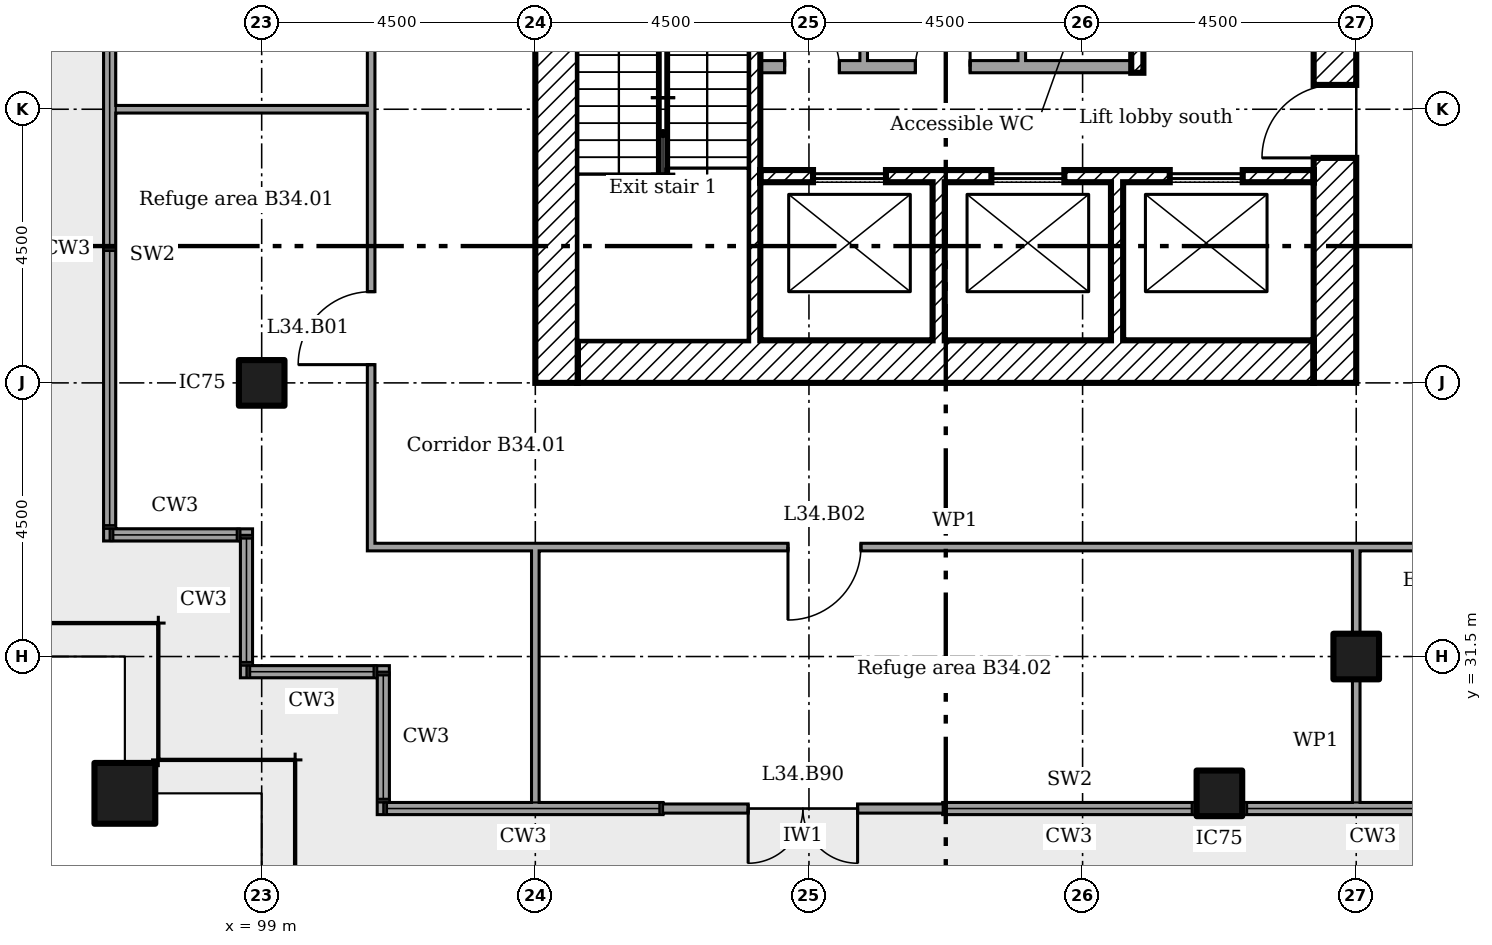
"""IFC4 building model, lengths in metres.
Left out: names, types, materials, properties, quantities, classifications, styles, units other than length and angle.
Written with IfcOpenShell. Run it as: python <this file> out.ifc"""

import sys

from ifc_helpers import new_model, si_unit, direction, frame, frame_2d, origin, origin_2d, place, context, subcontext, project, spatial, rectangle, extrude, element, fill, save


model = new_model("IFC4")
c1 = context("Model", 3, precision=1e-05, world=origin(), true_north=direction((0.0, 1.0)))
c2 = subcontext(c1, "Body", "Model", "MODEL_VIEW")
j1 = project(units=[si_unit("LENGTHUNIT", "METRE"), si_unit("PLANEANGLEUNIT", "RADIAN")], contexts=[c1])
p1 = place(None, origin())
s1 = spatial("IfcSite", under=j1, at=p1, CompositionType="ELEMENT")
p2 = place(p1, origin())
s2 = spatial("IfcBuilding", under=s1, at=p2, CompositionType="ELEMENT")
p3 = place(p2, frame((0.0, 0.0, 138.8)))
s3 = spatial("IfcBuildingStorey", under=s2, at=p3, CompositionType="ELEMENT", Elevation=138.8)
p4 = place(p3, frame((96.75, 29.25, 0.0)))
e1 = element("IfcColumn", 1, at=p4, inside=s3, PredefinedType="COLUMN", context=c2, shape_type="SweptSolid", body=[
    extrude(rectangle(XDim=1.0, YDim=1.0, at=origin_2d()), origin(), (0.0, 0.0, 1.0), 5.0),
])
for number, where in (
    (2, (99.0, 36.0, 0.0)),
    (3, (114.75, 29.25, 0.0)),
    (4, (117.0, 31.5, 0.0)),
):
    element("IfcColumn", number, at=place(p3, frame(where)), inside=s3, PredefinedType="COLUMN", context=c2, shape_type="SweptSolid", body=[
        extrude(rectangle(XDim=0.75, YDim=0.75, at=origin_2d()), origin(), (0.0, 0.0, 1.0), 5.0),
    ])
p5 = place(p3, frame((96.5, 42.8, 0.0), z_axis=(0.0, 0.0, 1.0), x_axis=(0.0, -1.0, 0.0)))
e5 = element("IfcWall", 5, at=p5, inside=s3, PredefinedType="ELEMENTEDWALL", context=c2, shape_type="SweptSolid", body=[
    extrude(rectangle(XDim=9.4, YDim=0.2, at=frame_2d((4.7, 0.0))), origin(), (0.0, 0.0, 1.0), 1.8),
])
p6 = place(p3, frame((96.6, 33.5, 0.0)))
e6 = element("IfcWall", 6, at=p6, inside=s3, PredefinedType="ELEMENTEDWALL", context=c2, shape_type="SweptSolid", body=[
    extrude(rectangle(XDim=2.25, YDim=0.2, at=frame_2d((1.125, 0.0))), origin(), (0.0, 0.0, 1.0), 1.8),
])
p7 = place(p3, frame((98.75, 33.4, 0.0), z_axis=(0.0, 0.0, 1.0), x_axis=(0.0, -1.0, 0.0)))
e7 = element("IfcWall", 7, at=p7, inside=s3, PredefinedType="ELEMENTEDWALL", context=c2, shape_type="SweptSolid", body=[
    extrude(rectangle(XDim=2.25, YDim=0.2, at=frame_2d((1.125, 0.0))), origin(), (0.0, 0.0, 1.0), 1.8),
])
p8 = place(p3, frame((98.85, 31.25, 0.0)))
e8 = element("IfcWall", 8, at=p8, inside=s3, PredefinedType="ELEMENTEDWALL", context=c2, shape_type="SweptSolid", body=[
    extrude(rectangle(XDim=2.25, YDim=0.2, at=frame_2d((1.125, 0.0))), origin(), (0.0, 0.0, 1.0), 1.8),
])
p9 = place(p3, frame((101.0, 31.15, 0.0), z_axis=(0.0, 0.0, 1.0), x_axis=(0.0, -1.0, 0.0)))
e9 = element("IfcWall", 9, at=p9, inside=s3, PredefinedType="ELEMENTEDWALL", context=c2, shape_type="SweptSolid", body=[
    extrude(rectangle(XDim=2.25, YDim=0.2, at=frame_2d((1.125, 0.0))), origin(), (0.0, 0.0, 1.0), 1.8),
])
p10 = place(p3, frame((101.1, 29.0, 0.0)))
e10 = element("IfcWall", 10, at=p10, inside=s3, PredefinedType="ELEMENTEDWALL", context=c2, shape_type="SweptSolid", body=[
    extrude(rectangle(XDim=4.5, YDim=0.2, at=frame_2d((2.25, 0.0))), origin(), (0.0, 0.0, 1.0), 1.8),
])
p11 = place(p3, frame((110.2, 29.0, 0.0)))
e11 = element("IfcWall", 11, at=p11, inside=s3, PredefinedType="ELEMENTEDWALL", context=c2, shape_type="SweptSolid", body=[
    extrude(rectangle(XDim=4.175, YDim=0.2, at=frame_2d((2.087, 0.0))), origin(), (0.0, 0.0, 1.0), 1.8),
])
p12 = place(p3, frame((115.125, 29.0, 0.0)))
e12 = element("IfcWall", 12, at=p12, inside=s3, PredefinedType="ELEMENTEDWALL", context=c2, shape_type="SweptSolid", body=[
    extrude(rectangle(XDim=4.475, YDim=0.2, at=frame_2d((2.238, 0.0))), origin(), (0.0, 0.0, 1.0), 1.8),
])
p13 = place(p3, frame((105.6, 29.0, 0.0)))
e13 = element("IfcWall", 13, at=p13, inside=s3, PredefinedType="SOLIDWALL", context=c2, shape_type="SweptSolid", body=[
    extrude(rectangle(XDim=4.6, YDim=0.15, at=frame_2d((2.3, 0.0))), origin(), (0.0, 0.0, 1.0), 4.85),
])
p14 = place(p13, frame((1.4, 0.0, 0.0)))
e14 = element("IfcOpeningElement", 14, at=p14, cuts=e13, PredefinedType="OPENING", context=c2, shape_type="SweptSolid", body=[
    extrude(rectangle(XDim=1.8, YDim=2.4, at=frame_2d((0.9, 1.2))), frame((0.0, 0.085, 0.0), z_axis=(0.0, -1.0, 0.0), x_axis=(1.0, 0.0, 0.0)), (0.0, 0.0, 1.0), 0.17),
])
p15 = place(p3, frame((116.65, 36.0, 0.0), z_axis=(0.0, 0.0, 1.0), x_axis=(0.0, 1.0, 0.0)))
e15 = element("IfcWall", 15, at=p15, inside=s3, PredefinedType="SHEAR", context=c2, shape_type="SweptSolid", body=[
    extrude(rectangle(XDim=13.5, YDim=0.7, at=frame_2d((6.75, 0.0))), origin(), (0.0, 0.0, 1.0), 4.75),
])
p16 = place(p15, frame((3.7, 0.0, 0.0)))
e16 = element("IfcOpeningElement", 16, at=p16, cuts=e15, PredefinedType="OPENING", context=c2, shape_type="SweptSolid", body=[
    extrude(rectangle(XDim=1.2, YDim=2.1, at=frame_2d((0.6, 1.05))), frame((0.0, 0.36, 0.0), z_axis=(0.0, -1.0, 0.0), x_axis=(1.0, 0.0, 0.0)), (0.0, 0.0, 1.0), 0.72),
])
p17 = place(p15, frame((6.275, 0.0, 0.0)))
e17 = element("IfcOpeningElement", 17, at=p17, cuts=e15, PredefinedType="OPENING", context=c2, shape_type="SweptSolid", body=[
    extrude(rectangle(XDim=1.0, YDim=2.1, at=frame_2d((0.5, 1.05))), frame((0.0, 0.36, 0.0), z_axis=(0.0, -1.0, 0.0), x_axis=(1.0, 0.0, 0.0)), (0.0, 0.0, 1.0), 0.72),
])
p18 = place(p3, frame((104.2, 36.35, 0.0)))
e18 = element("IfcWall", 18, at=p18, inside=s3, PredefinedType="SHEAR", context=c2, shape_type="SweptSolid", body=[
    extrude(rectangle(XDim=12.1, YDim=0.7, at=frame_2d((6.05, 0.0))), origin(), (0.0, 0.0, 1.0), 4.75),
])
p19 = place(p3, frame((103.85, 36.0, 0.0), z_axis=(0.0, 0.0, 1.0), x_axis=(0.0, 1.0, 0.0)))
e19 = element("IfcWall", 19, at=p19, inside=s3, PredefinedType="SHEAR", context=c2, shape_type="SweptSolid", body=[
    extrude(rectangle(XDim=13.5, YDim=0.7, at=frame_2d((6.75, 0.0))), origin(), (0.0, 0.0, 1.0), 4.75),
])
p20 = place(p19, frame((8.2, 0.0, 0.0)))
e20 = element("IfcOpeningElement", 20, at=p20, cuts=e19, PredefinedType="OPENING", context=c2, shape_type="SweptSolid", body=[
    extrude(rectangle(XDim=1.2, YDim=2.1, at=frame_2d((0.6, 1.05))), frame((0.0, 0.36, 0.0), z_axis=(0.0, -1.0, 0.0), x_axis=(1.0, 0.0, 0.0)), (0.0, 0.0, 1.0), 0.72),
])
p21 = place(p19, frame((6.225, 0.0, 0.0)))
e21 = element("IfcOpeningElement", 21, at=p21, cuts=e19, PredefinedType="OPENING", context=c2, shape_type="SweptSolid", body=[
    extrude(rectangle(XDim=1.0, YDim=2.1, at=frame_2d((0.5, 1.05))), frame((0.0, 0.36, 0.0), z_axis=(0.0, -1.0, 0.0), x_axis=(1.0, 0.0, 0.0)), (0.0, 0.0, 1.0), 0.72),
])
for number, where, z_axis, x_axis in (
    (22, (110.133, 36.7, 0.0), (0.0, 0.0, 1.0), (0.0, 1.0, 0.0)),
    (23, (113.067, 36.7, 0.0), (0.0, 0.0, 1.0), (0.0, 1.0, 0.0)),
):
    element("IfcWall", number, at=place(p3, frame(where, z_axis=z_axis, x_axis=x_axis)), inside=s3, PredefinedType="SHEAR", context=c2, shape_type="SweptSolid", body=[
        extrude(rectangle(XDim=2.6, YDim=0.2, at=frame_2d((1.3, 0.0))), origin(), (0.0, 0.0, 1.0), 4.75),
    ])
p22 = place(p3, frame((107.2, 39.4, 0.0)))
e24 = element("IfcWall", 24, at=p22, inside=s3, PredefinedType="SHEAR", context=c2, shape_type="SweptSolid", body=[
    extrude(rectangle(XDim=9.1, YDim=0.2, at=frame_2d((4.55, 0.0))), origin(), (0.0, 0.0, 1.0), 4.75),
])
p23 = place(p22, frame((0.867, 0.0, 0.0)))
e25 = element("IfcOpeningElement", 25, at=p23, cuts=e24, PredefinedType="OPENING", context=c2, shape_type="SweptSolid", body=[
    extrude(rectangle(XDim=1.2, YDim=2.1, at=frame_2d((0.6, 1.05))), frame((0.0, 0.11, 0.0), z_axis=(0.0, -1.0, 0.0), x_axis=(1.0, 0.0, 0.0)), (0.0, 0.0, 1.0), 0.22),
])
p24 = place(p22, frame((3.8, 0.0, 0.0)))
e26 = element("IfcOpeningElement", 26, at=p24, cuts=e24, PredefinedType="OPENING", context=c2, shape_type="SweptSolid", body=[
    extrude(rectangle(XDim=1.2, YDim=2.1, at=frame_2d((0.6, 1.05))), frame((0.0, 0.11, 0.0), z_axis=(0.0, -1.0, 0.0), x_axis=(1.0, 0.0, 0.0)), (0.0, 0.0, 1.0), 0.22),
])
p25 = place(p22, frame((6.733, 0.0, 0.0)))
e27 = element("IfcOpeningElement", 27, at=p25, cuts=e24, PredefinedType="OPENING", context=c2, shape_type="SweptSolid", body=[
    extrude(rectangle(XDim=1.2, YDim=2.1, at=frame_2d((0.6, 1.05))), frame((0.0, 0.11, 0.0), z_axis=(0.0, -1.0, 0.0), x_axis=(1.0, 0.0, 0.0)), (0.0, 0.0, 1.0), 0.22),
])
p26 = place(p3, frame((107.1, 36.7, 0.0), z_axis=(0.0, 0.0, 1.0), x_axis=(0.0, 1.0, 0.0)))
e28 = element("IfcWall", 28, at=p26, inside=s3, PredefinedType="SHEAR", context=c2, shape_type="SweptSolid", body=[
    extrude(rectangle(XDim=7.0, YDim=0.2, at=frame_2d((3.5, 0.0))), origin(), (0.0, 0.0, 1.0), 4.75),
])
p27 = place(p3, frame((113.4, 41.1, 0.0), z_axis=(0.0, 0.0, 1.0), x_axis=(0.0, 1.0, 0.0)))
e29 = element("IfcWall", 29, at=p27, inside=s3, PredefinedType="SHEAR", context=c2, shape_type="SweptSolid", body=[
    extrude(rectangle(XDim=7.7, YDim=0.2, at=frame_2d((3.85, 0.0))), origin(), (0.0, 0.0, 1.0), 4.75),
])
p28 = place(p3, frame((107.2, 41.2, 0.0)))
e30 = element("IfcWall", 30, at=p28, inside=s3, PredefinedType="PARTITIONING", context=c2, shape_type="SweptSolid", body=[
    extrude(rectangle(XDim=6.1, YDim=0.2, at=frame_2d((3.05, 0.0))), origin(), (0.0, 0.0, 1.0), 4.75),
])
p29 = place(p28, frame((0.4, 0.0, 0.0)))
e31 = element("IfcOpeningElement", 31, at=p29, cuts=e30, PredefinedType="OPENING", context=c2, shape_type="SweptSolid", body=[
    extrude(rectangle(XDim=0.9, YDim=2.1, at=frame_2d((0.45, 1.05))), frame((0.0, 0.11, 0.0), z_axis=(0.0, -1.0, 0.0), x_axis=(1.0, 0.0, 0.0)), (0.0, 0.0, 1.0), 0.22),
])
p30 = place(p28, frame((2.55, 0.0, 0.0)))
e32 = element("IfcOpeningElement", 32, at=p30, cuts=e30, PredefinedType="OPENING", context=c2, shape_type="SweptSolid", body=[
    extrude(rectangle(XDim=0.9, YDim=2.1, at=frame_2d((0.45, 1.05))), frame((0.0, 0.11, 0.0), z_axis=(0.0, -1.0, 0.0), x_axis=(1.0, 0.0, 0.0)), (0.0, 0.0, 1.0), 0.22),
])
for number, where, z_axis, x_axis in (
    (33, (108.9, 41.3, 0.0), (0.0, 0.0, 1.0), (0.0, 1.0, 0.0)),
    (34, (111.5, 41.3, 0.0), (0.0, 0.0, 1.0), (0.0, 1.0, 0.0)),
):
    element("IfcWall", number, at=place(p3, frame(where, z_axis=z_axis, x_axis=x_axis)), inside=s3, PredefinedType="PARTITIONING", context=c2, shape_type="SweptSolid", body=[
        extrude(rectangle(XDim=1.7, YDim=0.125, at=frame_2d((0.85, 0.0))), origin(), (0.0, 0.0, 1.0), 4.75),
    ])
p31 = place(p3, frame((100.738, 33.3, 0.0)))
e35 = element("IfcWall", 35, at=p31, inside=s3, PredefinedType="PARTITIONING", context=c2, shape_type="SweptSolid", body=[
    extrude(rectangle(XDim=19.325, YDim=0.125, at=frame_2d((9.663, 0.0))), origin(), (0.0, 0.0, 1.0), 4.85),
])
p32 = place(p31, frame((6.917, 0.0, 0.0)))
e36 = element("IfcOpeningElement", 36, at=p32, cuts=e35, PredefinedType="OPENING", context=c2, shape_type="SweptSolid", body=[
    extrude(rectangle(XDim=1.2, YDim=2.1, at=frame_2d((0.6, 1.05))), frame((0.0, 0.073, 0.0), z_axis=(0.0, -1.0, 0.0), x_axis=(1.0, 0.0, 0.0)), (0.0, 0.0, 1.0), 0.145),
])
p33 = place(p3, frame((96.6, 40.5, 0.0)))
e37 = element("IfcWall", 37, at=p33, inside=s3, PredefinedType="PARTITIONING", context=c2, shape_type="SweptSolid", body=[
    extrude(rectangle(XDim=4.2, YDim=0.125, at=frame_2d((2.1, 0.0))), origin(), (0.0, 0.0, 1.0), 4.251),
])
p34 = place(p3, frame((100.8, 33.363, 0.0), z_axis=(0.0, 0.0, 1.0), x_axis=(0.0, 1.0, 0.0)))
e38 = element("IfcWall", 38, at=p34, inside=s3, PredefinedType="PARTITIONING", context=c2, shape_type="SweptSolid", body=[
    extrude(rectangle(XDim=14.075, YDim=0.125, at=frame_2d((7.038, 0.0))), origin(), (0.0, 0.0, 1.0), 4.85),
])
p35 = place(p34, frame((2.938, 0.0, 0.0)))
e39 = element("IfcOpeningElement", 39, at=p35, cuts=e38, PredefinedType="OPENING", context=c2, shape_type="SweptSolid", body=[
    extrude(rectangle(XDim=1.2, YDim=2.1, at=frame_2d((0.6, 1.05))), frame((0.0, 0.073, 0.0), z_axis=(0.0, -1.0, 0.0), x_axis=(1.0, 0.0, 0.0)), (0.0, 0.0, 1.0), 0.145),
])
p36 = place(p34, frame((11.03, 0.0, 0.0)))
e40 = element("IfcOpeningElement", 40, at=p36, cuts=e38, PredefinedType="OPENING", context=c2, shape_type="SweptSolid", body=[
    extrude(rectangle(XDim=1.0, YDim=2.1, at=frame_2d((0.5, 1.05))), frame((0.0, 0.073, 0.0), z_axis=(0.0, -1.0, 0.0), x_axis=(1.0, 0.0, 0.0)), (0.0, 0.0, 1.0), 0.145),
])
p37 = place(p3, frame((103.5, 29.1, 0.0), z_axis=(0.0, 0.0, 1.0), x_axis=(0.0, 1.0, 0.0)))
e41 = element("IfcWall", 41, at=p37, inside=s3, PredefinedType="PARTITIONING", context=c2, shape_type="SweptSolid", body=[
    extrude(rectangle(XDim=4.2, YDim=0.125, at=frame_2d((2.1, 0.0))), origin(), (0.0, 0.0, 1.0), 4.251),
])
p38 = place(p3, frame((117.0, 29.1, 0.0), z_axis=(0.0, 0.0, 1.0), x_axis=(0.0, 1.0, 0.0)))
e42 = element("IfcWall", 42, at=p38, inside=s3, PredefinedType="PARTITIONING", context=c2, shape_type="SweptSolid", body=[
    extrude(rectangle(XDim=2.025, YDim=0.125, at=frame_2d((1.012, 0.0))), origin(), (0.0, 0.0, 1.0), 4.85),
])
p39 = place(p3, frame((117.0, 31.875, 0.0), z_axis=(0.0, 0.0, 1.0), x_axis=(0.0, 1.0, 0.0)))
e43 = element("IfcWall", 43, at=p39, inside=s3, PredefinedType="PARTITIONING", context=c2, shape_type="SweptSolid", body=[
    extrude(rectangle(XDim=1.425, YDim=0.125, at=frame_2d((0.712, 0.0))), origin(), (0.0, 0.0, 1.0), 3.85),
])
p40 = place(p14, frame((1.8, 0.0, 0.0), x_axis=(-1.0, 0.0, 0.0)))
e44 = element("IfcDoor", 44, at=p40, inside=s3, OperationType="DOUBLE_DOOR_DOUBLE_SWING", PredefinedType="NOTDEFINED", context=c2, shape_type="SweptSolid", body=[
    extrude(rectangle(XDim=1.8, YDim=2.4, at=frame_2d((0.9, 1.2))), frame((0.0, 0.025, 0.0), z_axis=(0.0, -1.0, 0.0), x_axis=(1.0, 0.0, 0.0)), (0.0, 0.0, 1.0), 0.05),
])
fill(e14, e44)
p41 = place(p16, origin())
e45 = element("IfcDoor", 45, at=p41, inside=s3, OperationType="SINGLE_SWING_RIGHT", PredefinedType="DOOR", context=c2, shape_type="SweptSolid", body=[
    extrude(rectangle(XDim=1.2, YDim=2.1, at=frame_2d((0.6, 1.05))), frame((0.0, 0.025, 0.0), z_axis=(0.0, -1.0, 0.0), x_axis=(1.0, 0.0, 0.0)), (0.0, 0.0, 1.0), 0.05),
])
fill(e16, e45)
p42 = place(p29, origin())
e46 = element("IfcDoor", 46, at=p42, inside=s3, OperationType="SINGLE_SWING_RIGHT", PredefinedType="DOOR", context=c2, shape_type="SweptSolid", body=[
    extrude(rectangle(XDim=0.9, YDim=2.1, at=frame_2d((0.45, 1.05))), frame((0.0, 0.025, 0.0), z_axis=(0.0, -1.0, 0.0), x_axis=(1.0, 0.0, 0.0)), (0.0, 0.0, 1.0), 0.05),
])
fill(e31, e46)
p43 = place(p30, origin())
e47 = element("IfcDoor", 47, at=p43, inside=s3, OperationType="SINGLE_SWING_LEFT", PredefinedType="DOOR", context=c2, shape_type="SweptSolid", body=[
    extrude(rectangle(XDim=0.9, YDim=2.1, at=frame_2d((0.45, 1.05))), frame((0.0, 0.025, 0.0), z_axis=(0.0, -1.0, 0.0), x_axis=(1.0, 0.0, 0.0)), (0.0, 0.0, 1.0), 0.05),
])
fill(e32, e47)
p44 = place(p23, origin())
e48 = element("IfcDoor", 48, at=p44, inside=s3, OperationType="SLIDING_TO_LEFT", PredefinedType="DOOR", context=c2, shape_type="SweptSolid", body=[
    extrude(rectangle(XDim=1.2, YDim=2.1, at=frame_2d((0.6, 1.05))), frame((0.0, 0.025, 0.0), z_axis=(0.0, -1.0, 0.0), x_axis=(1.0, 0.0, 0.0)), (0.0, 0.0, 1.0), 0.05),
])
fill(e25, e48)
p45 = place(p24, origin())
e49 = element("IfcDoor", 49, at=p45, inside=s3, OperationType="SLIDING_TO_LEFT", PredefinedType="DOOR", context=c2, shape_type="SweptSolid", body=[
    extrude(rectangle(XDim=1.2, YDim=2.1, at=frame_2d((0.6, 1.05))), frame((0.0, 0.025, 0.0), z_axis=(0.0, -1.0, 0.0), x_axis=(1.0, 0.0, 0.0)), (0.0, 0.0, 1.0), 0.05),
])
fill(e26, e49)
p46 = place(p25, origin())
e50 = element("IfcDoor", 50, at=p46, inside=s3, OperationType="SLIDING_TO_LEFT", PredefinedType="DOOR", context=c2, shape_type="SweptSolid", body=[
    extrude(rectangle(XDim=1.2, YDim=2.1, at=frame_2d((0.6, 1.05))), frame((0.0, 0.025, 0.0), z_axis=(0.0, -1.0, 0.0), x_axis=(1.0, 0.0, 0.0)), (0.0, 0.0, 1.0), 0.05),
])
fill(e27, e50)
p47 = place(p35, origin())
e51 = element("IfcDoor", 51, at=p47, inside=s3, OperationType="SINGLE_SWING_RIGHT", PredefinedType="DOOR", context=c2, shape_type="SweptSolid", body=[
    extrude(rectangle(XDim=1.2, YDim=2.1, at=frame_2d((0.6, 1.05))), frame((0.0, 0.025, 0.0), z_axis=(0.0, -1.0, 0.0), x_axis=(1.0, 0.0, 0.0)), (0.0, 0.0, 1.0), 0.05),
])
fill(e39, e51)
p48 = place(p32, frame((1.2, 0.0, 0.0), x_axis=(-1.0, 0.0, 0.0)))
e52 = element("IfcDoor", 52, at=p48, inside=s3, OperationType="SINGLE_SWING_LEFT", PredefinedType="DOOR", context=c2, shape_type="SweptSolid", body=[
    extrude(rectangle(XDim=1.2, YDim=2.1, at=frame_2d((0.6, 1.05))), frame((0.0, 0.025, 0.0), z_axis=(0.0, -1.0, 0.0), x_axis=(1.0, 0.0, 0.0)), (0.0, 0.0, 1.0), 0.05),
])
fill(e36, e52)
save(model, sys.argv[1])
